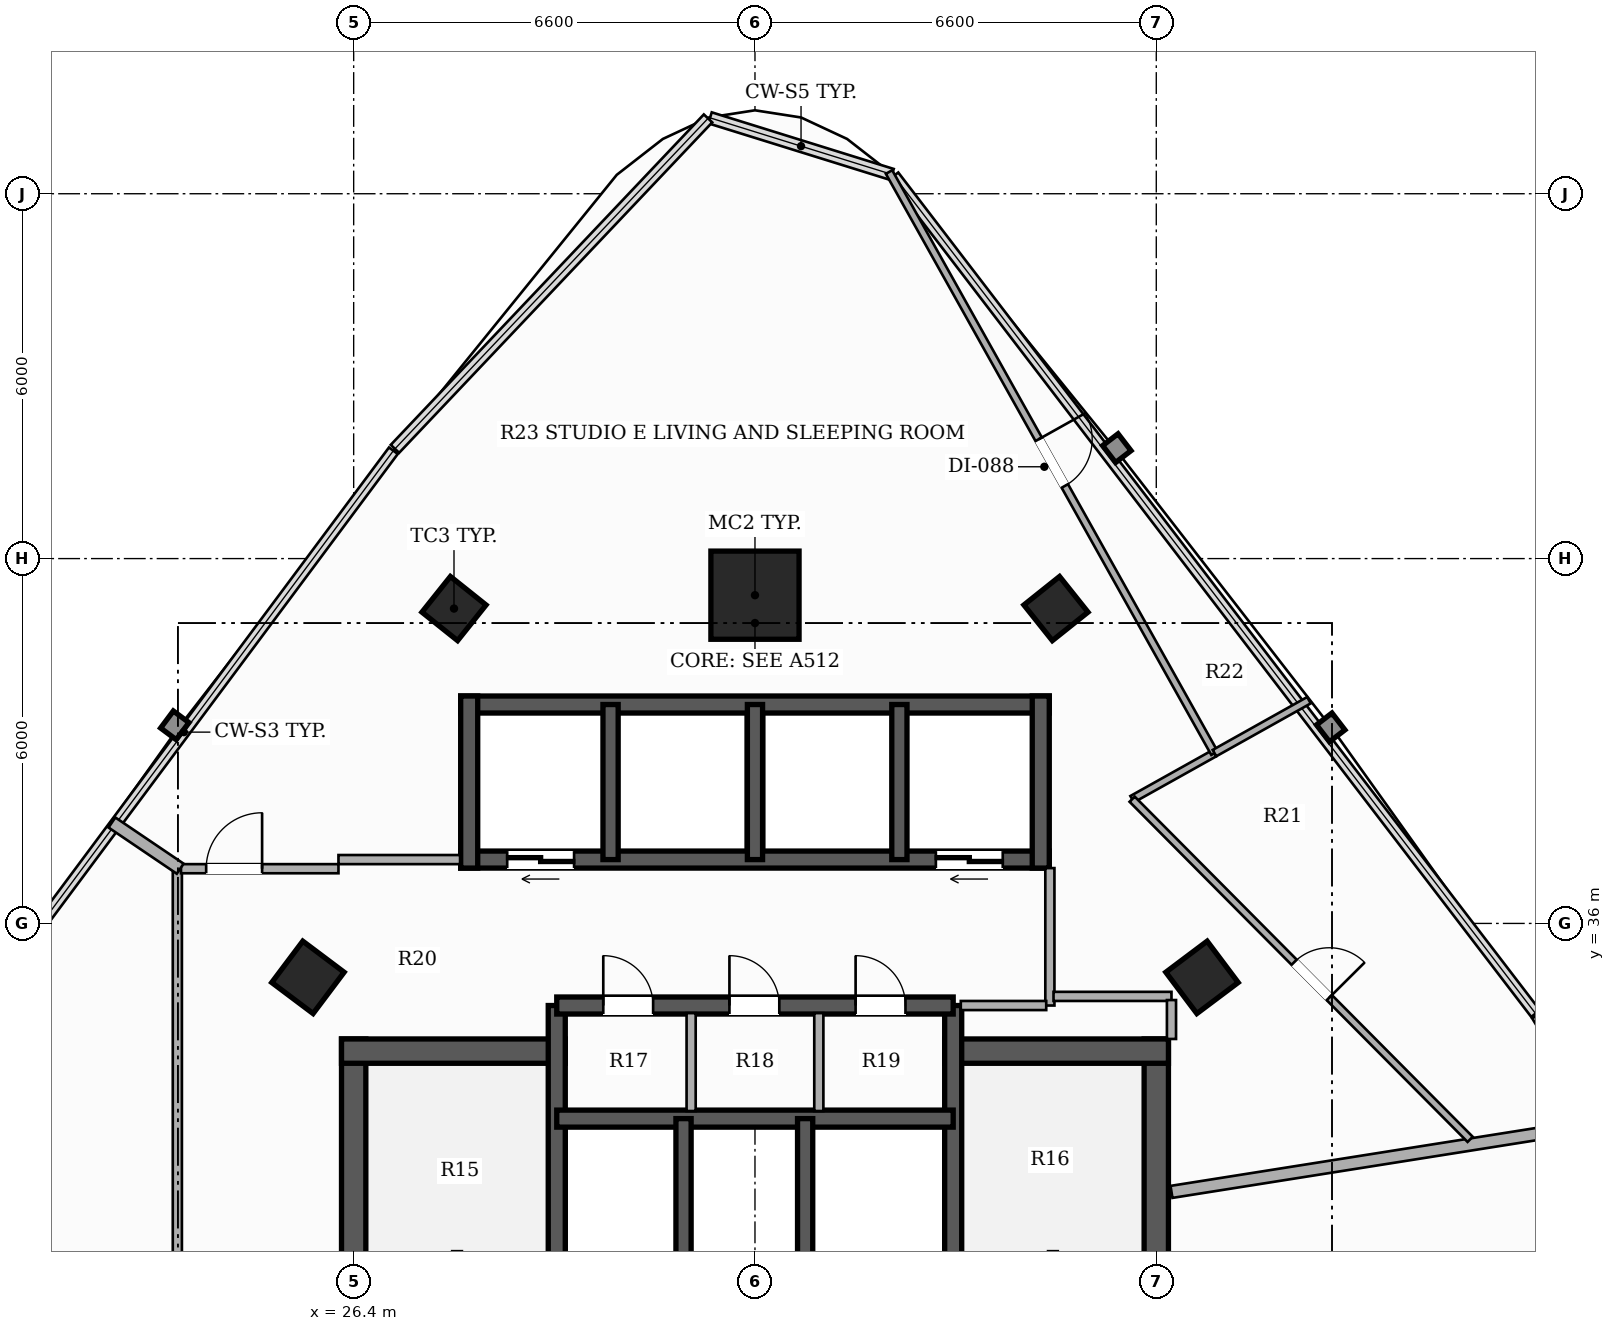
"""IFC4 building model, lengths in metres.
Left out: names, types, materials, properties, quantities, classifications, styles, units other than length and angle.
Written with IfcOpenShell. Run it as: python <this file> out.ifc"""

import sys

from ifc_helpers import new_model, si_unit, direction, frame, frame_2d, origin, origin_2d, place, context, subcontext, project, spatial, rectangle, hollow_rectangle, extrude, element, fill, save


model = new_model("IFC4")
c1 = context("Model", 3, precision=1e-05, world=origin(), true_north=direction((0.0, 1.0)))
c2 = subcontext(c1, "Body", "Model", "MODEL_VIEW")
j1 = project(units=[si_unit("LENGTHUNIT", "METRE"), si_unit("PLANEANGLEUNIT", "RADIAN")], contexts=[c1])
p1 = place(None, origin())
s1 = spatial("IfcSite", under=j1, at=p1, CompositionType="ELEMENT")
p2 = place(p1, origin())
s2 = spatial("IfcBuilding", under=s1, at=p2, CompositionType="ELEMENT")
p3 = place(p2, frame((0.0, 0.0, 123.2)))
s3 = spatial("IfcBuildingStorey", under=s2, at=p3, CompositionType="ELEMENT", Elevation=123.2)
p4 = place(p3, frame((26.4, 26.5, 0.0), z_axis=(0.0, 0.0, 1.0), x_axis=(0.0, 1.0, 0.0)))
e1 = element("IfcWall", 1, at=p4, inside=s3, PredefinedType="SHEAR", context=c2, shape_type="SweptSolid", body=[
    extrude(rectangle(XDim=7.6, YDim=0.4, at=frame_2d((3.8, 0.0))), origin(), (0.0, 0.0, 1.0), 3.3),
])
p5 = place(p3, frame((26.2, 33.9, 0.0), z_axis=(0.0, 0.0, 1.0), x_axis=(1.0, 0.0, 0.0)))
e2 = element("IfcWall", 2, at=p5, inside=s3, PredefinedType="SHEAR", context=c2, shape_type="SweptSolid", body=[
    extrude(rectangle(XDim=3.68, YDim=0.4, at=frame_2d((1.84, 0.0))), origin(), (0.0, 0.0, 1.0), 3.3),
])
p6 = place(p3, frame((39.6, 26.5, 0.0), z_axis=(0.0, 0.0, 1.0), x_axis=(0.0, 1.0, 0.0)))
e3 = element("IfcWall", 3, at=p6, inside=s3, PredefinedType="SHEAR", context=c2, shape_type="SweptSolid", body=[
    extrude(rectangle(XDim=7.6, YDim=0.4, at=frame_2d((3.8, 0.0))), origin(), (0.0, 0.0, 1.0), 3.3),
])
p7 = place(p3, frame((36.12, 33.9, 0.0), z_axis=(0.0, 0.0, 1.0), x_axis=(1.0, 0.0, 0.0)))
e4 = element("IfcWall", 4, at=p7, inside=s3, PredefinedType="SHEAR", context=c2, shape_type="SweptSolid", body=[
    extrude(rectangle(XDim=3.68, YDim=0.4, at=frame_2d((1.84, 0.0))), origin(), (0.0, 0.0, 1.0), 3.3),
])
p8 = place(p3, frame((29.74, 26.5, 0.0), z_axis=(0.0, 0.0, 1.0), x_axis=(0.0, 1.0, 0.0)))
e5 = element("IfcWall", 5, at=p8, inside=s3, PredefinedType="SHEAR", context=c2, shape_type="SweptSolid", body=[
    extrude(rectangle(XDim=8.15, YDim=0.28, at=frame_2d((4.075, 0.0))), origin(), (0.0, 0.0, 1.0), 3.3),
])
p9 = place(p8, frame((0.6, 0.0, 0.0)))
e6 = element("IfcOpeningElement", 6, at=p9, cuts=e5, PredefinedType="OPENING", context=c2, shape_type="SweptSolid", body=[
    extrude(rectangle(XDim=1.05, YDim=2.15, at=frame_2d((0.525, 1.075))), frame((0.0, 0.15, 0.0), z_axis=(0.0, -1.0, 0.0), x_axis=(1.0, 0.0, 0.0)), (0.0, 0.0, 1.0), 0.3),
])
p10 = place(p3, frame((36.26, 26.5, 0.0), z_axis=(0.0, 0.0, 1.0), x_axis=(0.0, 1.0, 0.0)))
e7 = element("IfcWall", 7, at=p10, inside=s3, PredefinedType="SHEAR", context=c2, shape_type="SweptSolid", body=[
    extrude(rectangle(XDim=8.15, YDim=0.28, at=frame_2d((4.075, 0.0))), origin(), (0.0, 0.0, 1.0), 3.3),
])
p11 = place(p10, frame((0.6, 0.0, 0.0)))
e8 = element("IfcOpeningElement", 8, at=p11, cuts=e7, PredefinedType="OPENING", context=c2, shape_type="SweptSolid", body=[
    extrude(rectangle(XDim=1.05, YDim=2.15, at=frame_2d((0.525, 1.075))), frame((0.0, 0.15, 0.0), z_axis=(0.0, -1.0, 0.0), x_axis=(1.0, 0.0, 0.0)), (0.0, 0.0, 1.0), 0.3),
])
p12 = place(p3, frame((29.74, 32.79, 0.0), z_axis=(0.0, 0.0, 1.0), x_axis=(1.0, 0.0, 0.0)))
e9 = element("IfcWall", 9, at=p12, inside=s3, PredefinedType="SHEAR", context=c2, shape_type="SweptSolid", body=[
    extrude(rectangle(XDim=6.52, YDim=0.28, at=frame_2d((3.26, 0.0))), origin(), (0.0, 0.0, 1.0), 3.3),
])
for number, where, z_axis, x_axis in (
    (10, (31.825, 29.89, 0.0), (0.0, 0.0, 1.0), (0.0, 1.0, 0.0)),
    (11, (33.825, 29.89, 0.0), (0.0, 0.0, 1.0), (0.0, 1.0, 0.0)),
):
    element("IfcWall", number, at=place(p3, frame(where, z_axis=z_axis, x_axis=x_axis)), inside=s3, PredefinedType="SHEAR", context=c2, shape_type="SweptSolid", body=[
        extrude(rectangle(XDim=2.9, YDim=0.25, at=frame_2d((1.45, 0.0))), origin(), (0.0, 0.0, 1.0), 3.3),
    ])
p13 = place(p3, frame((29.74, 34.65, 0.0), z_axis=(0.0, 0.0, 1.0), x_axis=(1.0, 0.0, 0.0)))
e12 = element("IfcWall", 12, at=p13, inside=s3, PredefinedType="SHEAR", context=c2, shape_type="SweptSolid", body=[
    extrude(rectangle(XDim=6.52, YDim=0.28, at=frame_2d((3.26, 0.0))), origin(), (0.0, 0.0, 1.0), 3.3),
])
p14 = place(p13, frame((0.765, 0.0, 0.0)))
e13 = element("IfcOpeningElement", 13, at=p14, cuts=e12, PredefinedType="OPENING", context=c2, shape_type="SweptSolid", body=[
    extrude(rectangle(XDim=0.82, YDim=2.1, at=frame_2d((0.41, 1.05))), frame((0.0, 0.15, 0.0), z_axis=(0.0, -1.0, 0.0), x_axis=(1.0, 0.0, 0.0)), (0.0, 0.0, 1.0), 0.3),
])
p15 = place(p13, frame((2.84, 0.0, 0.0)))
e14 = element("IfcOpeningElement", 14, at=p15, cuts=e12, PredefinedType="OPENING", context=c2, shape_type="SweptSolid", body=[
    extrude(rectangle(XDim=0.82, YDim=2.1, at=frame_2d((0.41, 1.05))), frame((0.0, 0.15, 0.0), z_axis=(0.0, -1.0, 0.0), x_axis=(1.0, 0.0, 0.0)), (0.0, 0.0, 1.0), 0.3),
])
p16 = place(p13, frame((4.915, 0.0, 0.0)))
e15 = element("IfcOpeningElement", 15, at=p16, cuts=e12, PredefinedType="OPENING", context=c2, shape_type="SweptSolid", body=[
    extrude(rectangle(XDim=0.82, YDim=2.1, at=frame_2d((0.41, 1.05))), frame((0.0, 0.15, 0.0), z_axis=(0.0, -1.0, 0.0), x_axis=(1.0, 0.0, 0.0)), (0.0, 0.0, 1.0), 0.3),
])
p17 = place(p3, frame((37.84, 37.05, 0.0), z_axis=(0.0, 0.0, 1.0), x_axis=(-1.0, 0.0, 0.0)))
e16 = element("IfcWall", 16, at=p17, inside=s3, PredefinedType="SHEAR", context=c2, shape_type="SweptSolid", body=[
    extrude(rectangle(XDim=9.68, YDim=0.28, at=frame_2d((4.84, 0.0))), origin(), (0.0, 0.0, 1.0), 3.3),
])
p18 = place(p17, frame((7.815, 0.0, 0.0)))
e17 = element("IfcOpeningElement", 17, at=p18, cuts=e16, PredefinedType="OPENING", context=c2, shape_type="SweptSolid", body=[
    extrude(rectangle(XDim=1.1, YDim=2.2, at=frame_2d((0.55, 1.1))), frame((0.0, 0.15, 0.0), z_axis=(0.0, -1.0, 0.0), x_axis=(1.0, 0.0, 0.0)), (0.0, 0.0, 1.0), 0.3),
])
p19 = place(p17, frame((0.765, 0.0, 0.0)))
e18 = element("IfcOpeningElement", 18, at=p19, cuts=e16, PredefinedType="OPENING", context=c2, shape_type="SweptSolid", body=[
    extrude(rectangle(XDim=1.1, YDim=2.2, at=frame_2d((0.55, 1.1))), frame((0.0, 0.15, 0.0), z_axis=(0.0, -1.0, 0.0), x_axis=(1.0, 0.0, 0.0)), (0.0, 0.0, 1.0), 0.3),
])
p20 = place(p3, frame((28.16, 39.6, 0.0), z_axis=(0.0, 0.0, 1.0), x_axis=(1.0, 0.0, 0.0)))
e19 = element("IfcWall", 19, at=p20, inside=s3, PredefinedType="SHEAR", context=c2, shape_type="SweptSolid", body=[
    extrude(rectangle(XDim=9.68, YDim=0.28, at=frame_2d((4.84, 0.0))), origin(), (0.0, 0.0, 1.0), 3.3),
])
for number, where, z_axis, x_axis in (
    (20, (28.3, 36.91, 0.0), (0.0, 0.0, 1.0), (0.0, 1.0, 0.0)),
    (21, (37.7, 36.91, 0.0), (0.0, 0.0, 1.0), (0.0, 1.0, 0.0)),
):
    element("IfcWall", number, at=place(p3, frame(where, z_axis=z_axis, x_axis=x_axis)), inside=s3, PredefinedType="SHEAR", context=c2, shape_type="SweptSolid", body=[
        extrude(rectangle(XDim=2.83, YDim=0.28, at=frame_2d((1.415, 0.0))), origin(), (0.0, 0.0, 1.0), 3.3),
    ])
for number, where, z_axis, x_axis in (
    (22, (30.625, 37.05, 0.0), (0.0, 0.0, 1.0), (0.0, 1.0, 0.0)),
    (23, (33.0, 37.05, 0.0), (0.0, 0.0, 1.0), (0.0, 1.0, 0.0)),
    (24, (35.375, 37.05, 0.0), (0.0, 0.0, 1.0), (0.0, 1.0, 0.0)),
):
    element("IfcWall", number, at=place(p3, frame(where, z_axis=z_axis, x_axis=x_axis)), inside=s3, PredefinedType="SHEAR", context=c2, shape_type="SweptSolid", body=[
        extrude(rectangle(XDim=2.55, YDim=0.25, at=frame_2d((1.275, 0.0))), origin(), (0.0, 0.0, 1.0), 3.3),
    ])
p21 = place(p3, frame((33.0, 41.398, 0.0), z_axis=(0.0, 0.0, 1.0), x_axis=(1.0, 0.0, 0.0)))
e25 = element("IfcColumn", 25, at=p21, inside=s3, PredefinedType="COLUMN", context=c2, shape_type="SweptSolid", body=[
    extrude(hollow_rectangle(XDim=1.45, YDim=1.45, WallThickness=0.045, at=origin_2d()), origin(), (0.0, 0.0, 1.0), 3.3),
])
for number, where, z_axis, x_axis in (
    (26, (25.648, 35.113, 0.0), (0.0, 0.0, 1.0), (0.6, 0.8, 0.0)),
    (27, (40.352, 35.113, 0.0), (0.0, 0.0, 1.0), (-0.6, 0.8, 0.0)),
):
    element("IfcColumn", number, at=place(p3, frame(where, z_axis=z_axis, x_axis=x_axis)), inside=s3, PredefinedType="COLUMN", context=c2, shape_type="SweptSolid", body=[
        extrude(hollow_rectangle(XDim=0.85, YDim=0.85, WallThickness=0.028, at=origin_2d()), origin(), (0.0, 0.0, 1.0), 3.3),
    ])
for number, where, z_axis, x_axis in (
    (28, (28.05, 41.178, 0.0), (0.0, 0.0, 1.0), (0.624, 0.782, 0.0)),
    (29, (37.95, 41.178, 0.0), (0.0, 0.0, 1.0), (-0.624, 0.782, 0.0)),
):
    element("IfcColumn", number, at=place(p3, frame(where, z_axis=z_axis, x_axis=x_axis)), inside=s3, PredefinedType="COLUMN", context=c2, shape_type="SweptSolid", body=[
        extrude(hollow_rectangle(XDim=0.75, YDim=0.75, WallThickness=0.025, at=origin_2d()), origin(), (0.0, 0.0, 1.0), 3.3),
    ])
p22 = place(p3, frame((37.85, 34.65, 0.0), z_axis=(0.0, 0.0, 1.0), x_axis=(0.0, 1.0, 0.0)))
e30 = element("IfcWall", 30, at=p22, inside=s3, PredefinedType="PARTITIONING", context=c2, shape_type="SweptSolid", body=[
    extrude(rectangle(XDim=2.26, YDim=0.15, at=frame_2d((1.13, 0.0))), origin(), (0.0, 0.0, 1.0), 3.06),
])
p23 = place(p3, frame((36.385, 34.65, 0.0), z_axis=(0.0, 0.0, 1.0), x_axis=(1.0, 0.0, 0.0)))
e31 = element("IfcWall", 31, at=p23, inside=s3, PredefinedType="PARTITIONING", context=c2, shape_type="SweptSolid", body=[
    extrude(rectangle(XDim=1.405, YDim=0.15, at=frame_2d((0.703, 0.0))), origin(), (0.0, 0.0, 1.0), 2.425),
])
for number, where, z_axis, x_axis in (
    (32, (31.95, 32.915, 0.0), (0.0, 0.0, 1.0), (0.0, 1.0, 0.0)),
    (33, (34.05, 32.915, 0.0), (0.0, 0.0, 1.0), (0.0, 1.0, 0.0)),
):
    element("IfcWall", number, at=place(p3, frame(where, z_axis=z_axis, x_axis=x_axis)), inside=s3, PredefinedType="PARTITIONING", context=c2, shape_type="SweptSolid", body=[
        extrude(rectangle(XDim=1.61, YDim=0.15, at=frame_2d((0.805, 0.0))), origin(), (0.0, 0.0, 1.0), 3.06),
    ])
p24 = place(p3, frame((23.5, 14.06, 0.0), z_axis=(0.0, 0.0, 1.0), x_axis=(0.0, 1.0, 0.0)))
e34 = element("IfcWall", 34, at=p24, inside=s3, PredefinedType="PARTITIONING", context=c2, shape_type="SweptSolid", body=[
    extrude(rectangle(XDim=22.84, YDim=0.15, at=frame_2d((11.42, 0.0))), origin(), (0.0, 0.0, 1.0), 2.413),
])
p25 = place(p24, frame((13.17, 0.0, 0.0)))
e35 = element("IfcOpeningElement", 35, at=p25, cuts=e34, PredefinedType="OPENING", context=c2, shape_type="SweptSolid", body=[
    extrude(rectangle(XDim=0.88, YDim=2.1, at=frame_2d((0.44, 1.05))), frame((0.0, 0.085, 0.0), z_axis=(0.0, -1.0, 0.0), x_axis=(1.0, 0.0, 0.0)), (0.0, 0.0, 1.0), 0.17),
])
p26 = place(p3, frame((23.56, 36.9, 0.0), z_axis=(0.0, 0.0, 1.0), x_axis=(1.0, 0.0, 0.0)))
e36 = element("IfcWall", 36, at=p26, inside=s3, PredefinedType="PARTITIONING", context=c2, shape_type="SweptSolid", body=[
    extrude(rectangle(XDim=2.59, YDim=0.15, at=frame_2d((1.295, 0.0))), origin(), (0.0, 0.0, 1.0), 2.413),
])
p27 = place(p26, frame((0.414, 0.0, 0.0)))
e37 = element("IfcOpeningElement", 37, at=p27, cuts=e36, PredefinedType="OPENING", context=c2, shape_type="SweptSolid", body=[
    extrude(rectangle(XDim=0.92, YDim=2.15, at=frame_2d((0.46, 1.075))), frame((0.0, 0.085, 0.0), z_axis=(0.0, -1.0, 0.0), x_axis=(1.0, 0.0, 0.0)), (0.0, 0.0, 1.0), 0.17),
])
p28 = place(p3, frame((26.15, 37.05, 0.0), z_axis=(0.0, 0.0, 1.0), x_axis=(1.0, 0.0, 0.0)))
e38 = element("IfcWall", 38, at=p28, inside=s3, PredefinedType="PARTITIONING", context=c2, shape_type="SweptSolid", body=[
    extrude(rectangle(XDim=2.0, YDim=0.15, at=frame_2d((1.0, 0.0))), origin(), (0.0, 0.0, 1.0), 2.413),
])
p29 = place(p3, frame((37.91, 34.8, 0.0), z_axis=(0.0, 0.0, 1.0), x_axis=(1.0, 0.0, 0.0)))
e39 = element("IfcWall", 39, at=p29, inside=s3, PredefinedType="PARTITIONING", context=c2, shape_type="SweptSolid", body=[
    extrude(rectangle(XDim=1.94, YDim=0.15, at=frame_2d((0.97, 0.0))), origin(), (0.0, 0.0, 1.0), 2.721),
])
p30 = place(p3, frame((39.85, 34.74, 0.0), z_axis=(0.0, 0.0, 1.0), x_axis=(0.0, -1.0, 0.0)))
e40 = element("IfcWall", 40, at=p30, inside=s3, PredefinedType="PARTITIONING", context=c2, shape_type="SweptSolid", body=[
    extrude(rectangle(XDim=0.64, YDim=0.15, at=frame_2d((0.32, 0.0))), origin(), (0.0, 0.0, 1.0), 2.721),
])
p31 = place(p3, frame((22.424, 37.66, 0.0), z_axis=(0.0, 0.0, 1.0), x_axis=(0.82818018374, -0.560461937388, 0.0)))
e41 = element("IfcWall", 41, at=p31, inside=s3, PredefinedType="PARTITIONING", context=c2, shape_type="SweptSolid", body=[
    extrude(rectangle(XDim=1.356, YDim=0.2, at=frame_2d((0.678, 0.0))), origin(), (0.0, 0.0, 1.0), 3.06),
])
p32 = place(p3, frame((46.976, 32.714, 0.0), z_axis=(0.0, 0.0, 1.0), x_axis=(-0.987677489662, -0.156502959767, 0.0)))
e42 = element("IfcWall", 42, at=p32, inside=s3, PredefinedType="PARTITIONING", context=c2, shape_type="SweptSolid", body=[
    extrude(rectangle(XDim=7.215, YDim=0.2, at=frame_2d((3.607, 0.0))), origin(), (0.0, 0.0, 1.0), 2.413),
])
p33 = place(p3, frame((40.557, 38.8, 0.0), z_axis=(0.0, 0.0, 1.0), x_axis=(-0.872825188639, -0.488032980521, 0.0)))
e43 = element("IfcWall", 43, at=p33, inside=s3, PredefinedType="PARTITIONING", context=c2, shape_type="SweptSolid", body=[
    extrude(rectangle(XDim=1.551, YDim=0.12, at=frame_2d((0.776, 0.0))), origin(), (0.0, 0.0, 1.0), 2.413),
])
p34 = place(p3, frame((39.203, 38.043, 0.0), z_axis=(0.0, 0.0, 1.0), x_axis=(0.704889894519, -0.709316739267, 0.0)))
e44 = element("IfcWall", 44, at=p34, inside=s3, PredefinedType="PARTITIONING", context=c2, shape_type="SweptSolid", body=[
    extrude(rectangle(XDim=7.886, YDim=0.12, at=frame_2d((3.943, 0.0))), origin(), (0.0, 0.0, 1.0), 2.413),
])
p35 = place(p34, frame((3.78, 0.0, 0.0)))
e45 = element("IfcOpeningElement", 45, at=p35, cuts=e44, PredefinedType="OPENING", context=c2, shape_type="SweptSolid", body=[
    extrude(rectangle(XDim=0.82, YDim=2.1, at=frame_2d((0.41, 1.05))), frame((0.0, 0.07, 0.0), z_axis=(0.0, -1.0, 0.0), x_axis=(1.0, 0.0, 0.0)), (0.0, 0.0, 1.0), 0.14),
])
p36 = place(p3, frame((35.205, 48.357, 0.0), z_axis=(0.0, 0.0, 1.0), x_axis=(0.488599975334, -0.872507916356, 0.0)))
e46 = element("IfcWall", 46, at=p36, inside=s3, PredefinedType="PARTITIONING", context=c2, shape_type="SweptSolid", body=[
    extrude(rectangle(XDim=10.953, YDim=0.12, at=frame_2d((5.477, 0.0))), origin(), (0.0, 0.0, 1.0), 2.619),
])
p37 = place(p36, frame((5.037, 0.0, 0.0)))
e47 = element("IfcOpeningElement", 47, at=p37, cuts=e46, PredefinedType="OPENING", context=c2, shape_type="SweptSolid", body=[
    extrude(rectangle(XDim=0.88, YDim=2.1, at=frame_2d((0.44, 1.05))), frame((0.0, 0.07, 0.0), z_axis=(0.0, -1.0, 0.0), x_axis=(1.0, 0.0, 0.0)), (0.0, 0.0, 1.0), 0.14),
])
p38 = place(p3, frame((40.557, 38.801, 0.0), z_axis=(0.0, 0.0, 1.0), x_axis=(0.872620527381, 0.488398828002, 0.0)))
e48 = element("IfcWall", 48, at=p38, inside=s3, PredefinedType="PARTITIONING", context=c2, shape_type="SweptSolid", body=[
    extrude(rectangle(XDim=1.781, YDim=0.12, at=frame_2d((0.891, 0.0))), origin(), (0.0, 0.0, 1.0), 3.06),
])
p39 = place(p18, origin())
e49 = element("IfcDoor", 49, at=p39, inside=s3, OperationType="DOUBLE_DOOR_SLIDING", PredefinedType="DOOR", context=c2, shape_type="SweptSolid", body=[
    extrude(rectangle(XDim=1.1, YDim=2.2, at=frame_2d((0.55, 1.1))), frame((0.0, 0.025, 0.0), z_axis=(0.0, -1.0, 0.0), x_axis=(1.0, 0.0, 0.0)), (0.0, 0.0, 1.0), 0.05),
])
fill(e17, e49)
p40 = place(p19, origin())
e50 = element("IfcDoor", 50, at=p40, inside=s3, OperationType="DOUBLE_DOOR_SLIDING", PredefinedType="DOOR", context=c2, shape_type="SweptSolid", body=[
    extrude(rectangle(XDim=1.1, YDim=2.2, at=frame_2d((0.55, 1.1))), frame((0.0, 0.025, 0.0), z_axis=(0.0, -1.0, 0.0), x_axis=(1.0, 0.0, 0.0)), (0.0, 0.0, 1.0), 0.05),
])
fill(e18, e50)
p41 = place(p14, origin())
e51 = element("IfcDoor", 51, at=p41, inside=s3, OperationType="SINGLE_SWING_LEFT", PredefinedType="DOOR", context=c2, shape_type="SweptSolid", body=[
    extrude(rectangle(XDim=0.82, YDim=2.1, at=frame_2d((0.41, 1.05))), frame((0.0, 0.025, 0.0), z_axis=(0.0, -1.0, 0.0), x_axis=(1.0, 0.0, 0.0)), (0.0, 0.0, 1.0), 0.05),
])
fill(e13, e51)
p42 = place(p15, origin())
e52 = element("IfcDoor", 52, at=p42, inside=s3, OperationType="SINGLE_SWING_LEFT", PredefinedType="DOOR", context=c2, shape_type="SweptSolid", body=[
    extrude(rectangle(XDim=0.82, YDim=2.1, at=frame_2d((0.41, 1.05))), frame((0.0, 0.025, 0.0), z_axis=(0.0, -1.0, 0.0), x_axis=(1.0, 0.0, 0.0)), (0.0, 0.0, 1.0), 0.05),
])
fill(e14, e52)
p43 = place(p16, origin())
e53 = element("IfcDoor", 53, at=p43, inside=s3, OperationType="SINGLE_SWING_LEFT", PredefinedType="DOOR", context=c2, shape_type="SweptSolid", body=[
    extrude(rectangle(XDim=0.82, YDim=2.1, at=frame_2d((0.41, 1.05))), frame((0.0, 0.025, 0.0), z_axis=(0.0, -1.0, 0.0), x_axis=(1.0, 0.0, 0.0)), (0.0, 0.0, 1.0), 0.05),
])
fill(e15, e53)
p44 = place(p27, origin())
e54 = element("IfcDoor", 54, at=p44, inside=s3, OperationType="SINGLE_SWING_RIGHT", PredefinedType="DOOR", context=c2, shape_type="SweptSolid", body=[
    extrude(rectangle(XDim=0.92, YDim=2.15, at=frame_2d((0.46, 1.075))), frame((0.0, 0.025, 0.0), z_axis=(0.0, -1.0, 0.0), x_axis=(1.0, 0.0, 0.0)), (0.0, 0.0, 1.0), 0.05),
])
fill(e37, e54)
p45 = place(p35, origin())
e55 = element("IfcDoor", 55, at=p45, inside=s3, OperationType="SINGLE_SWING_RIGHT", PredefinedType="DOOR", context=c2, shape_type="SweptSolid", body=[
    extrude(rectangle(XDim=0.82, YDim=2.1, at=frame_2d((0.41, 1.05))), frame((0.0, 0.025, 0.0), z_axis=(0.0, -1.0, 0.0), x_axis=(1.0, 0.0, 0.0)), (0.0, 0.0, 1.0), 0.05),
])
fill(e45, e55)
p46 = place(p37, origin())
e56 = element("IfcDoor", 56, at=p46, inside=s3, OperationType="SINGLE_SWING_LEFT", PredefinedType="DOOR", context=c2, shape_type="SweptSolid", body=[
    extrude(rectangle(XDim=0.88, YDim=2.1, at=frame_2d((0.44, 1.05))), frame((0.0, 0.025, 0.0), z_axis=(0.0, -1.0, 0.0), x_axis=(1.0, 0.0, 0.0)), (0.0, 0.0, 1.0), 0.05),
])
fill(e47, e56)
save(model, sys.argv[1])
